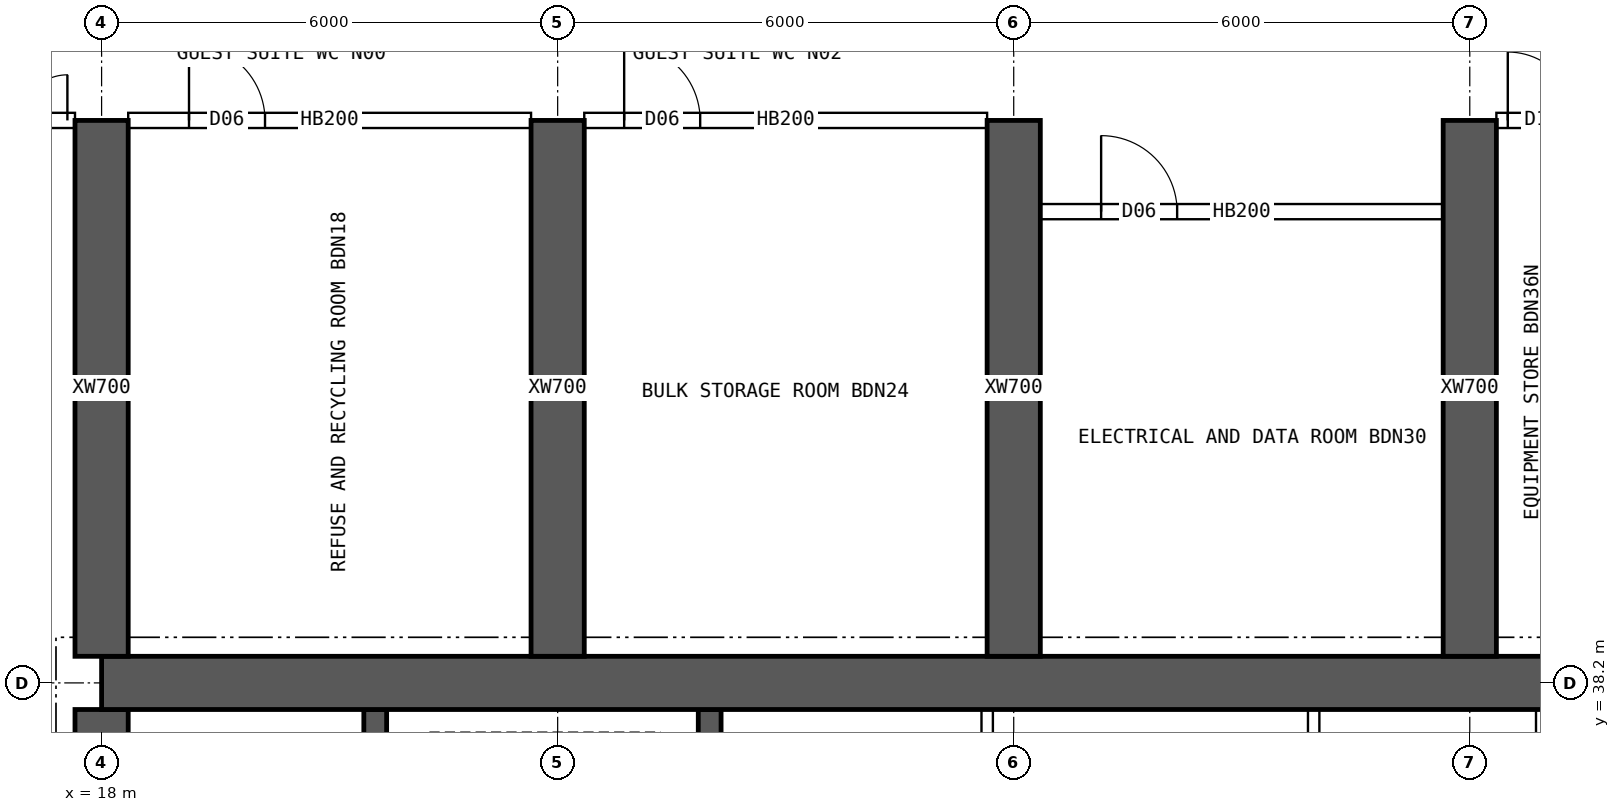
"""IFC4 building model, lengths in metres.
Left out: names, types, materials, properties, quantities, classifications, styles, units other than length and angle.
Written with IfcOpenShell. Run it as: python <this file> out.ifc"""

import sys

from ifc_helpers import new_model, si_unit, direction, frame, frame_2d, origin, place, context, subcontext, project, spatial, rectangle, extrude, element, fill, save


model = new_model("IFC4")
c1 = context("Model", 3, precision=1e-05, world=origin(), true_north=direction((0.0, 1.0)))
c2 = subcontext(c1, "Body", "Model", "MODEL_VIEW")
j1 = project(units=[si_unit("LENGTHUNIT", "METRE"), si_unit("PLANEANGLEUNIT", "RADIAN")], contexts=[c1])
p1 = place(None, origin())
s1 = spatial("IfcSite", under=j1, at=p1, CompositionType="ELEMENT")
p2 = place(p1, origin())
s2 = spatial("IfcBuilding", under=s1, at=p2, CompositionType="ELEMENT")
p3 = place(p2, frame((0.0, 0.0, 239.05)))
s3 = spatial("IfcBuildingStorey", under=s2, at=p3, CompositionType="ELEMENT", Elevation=239.05)
p4 = place(p3, frame((18.0, 38.2, 0.0), z_axis=(0.0, 0.0, 1.0), x_axis=(1.0, 0.0, 0.0)))
e1 = element("IfcWall", 1, at=p4, inside=s3, PredefinedType="SHEAR", context=c2, shape_type="SweptSolid", body=[
    extrude(rectangle(XDim=48.0, YDim=0.7, at=frame_2d((24.0, 0.0))), origin(), (0.0, 0.0, 1.0), 3.75),
])
p5 = place(p3, frame((18.0, 26.15, 0.0), z_axis=(0.0, 0.0, 1.0), x_axis=(0.0, 1.0, 0.0)))
e2 = element("IfcWall", 2, at=p5, inside=s3, PredefinedType="SHEAR", context=c2, shape_type="SweptSolid", body=[
    extrude(rectangle(XDim=11.7, YDim=0.7, at=frame_2d((5.85, 0.0))), origin(), (0.0, 0.0, 1.0), 3.75),
])
p6 = place(p5, frame((5.15, 0.0, 0.0)))
e3 = element("IfcOpeningElement", 3, at=p6, cuts=e2, PredefinedType="OPENING", context=c2, shape_type="SweptSolid", body=[
    extrude(rectangle(XDim=1.2, YDim=2.1, at=frame_2d((0.6, 1.05))), frame((0.0, 0.36, 0.0), z_axis=(0.0, -1.0, 0.0), x_axis=(1.0, 0.0, 0.0)), (0.0, 0.0, 1.0), 0.72),
])
for number, where, z_axis, x_axis in (
    (4, (21.6, 34.75, 0.0), (0.0, 0.0, 1.0), (0.0, 1.0, 0.0)),
    (5, (26.0, 34.75, 0.0), (0.0, 0.0, 1.0), (0.0, 1.0, 0.0)),
):
    element("IfcWall", number, at=place(p3, frame(where, z_axis=z_axis, x_axis=x_axis)), inside=s3, PredefinedType="SHEAR", context=c2, shape_type="SweptSolid", body=[
        extrude(rectangle(XDim=3.1, YDim=0.3, at=frame_2d((1.55, 0.0))), origin(), (0.0, 0.0, 1.0), 3.75),
    ])
for number, where, z_axis, x_axis in (
    (6, (18.0, 38.55, 0.0), (0.0, 0.0, 1.0), (0.0, 1.0, 0.0)),
    (7, (24.0, 38.55, 0.0), (0.0, 0.0, 1.0), (0.0, 1.0, 0.0)),
    (8, (30.0, 38.55, 0.0), (0.0, 0.0, 1.0), (0.0, 1.0, 0.0)),
    (9, (36.0, 38.55, 0.0), (0.0, 0.0, 1.0), (0.0, 1.0, 0.0)),
):
    element("IfcWall", number, at=place(p3, frame(where, z_axis=z_axis, x_axis=x_axis)), inside=s3, PredefinedType="SHEAR", context=c2, shape_type="SweptSolid", body=[
        extrude(rectangle(XDim=7.05, YDim=0.7, at=frame_2d((3.525, 0.0))), origin(), (0.0, 0.0, 1.0), 3.75),
    ])
for number, where, z_axis, x_axis in (
    (10, (29.651, 34.75, 0.0), (0.0, 0.0, 1.0), (0.0, 1.0, 0.0)),
    (11, (33.946, 34.75, 0.0), (0.0, 0.0, 1.0), (0.0, 1.0, 0.0)),
    (12, (36.946, 34.75, 0.0), (0.0, 0.0, 1.0), (0.0, 1.0, 0.0)),
):
    element("IfcWall", number, at=place(p3, frame(where, z_axis=z_axis, x_axis=x_axis)), inside=s3, PredefinedType="SOLIDWALL", context=c2, shape_type="SweptSolid", body=[
        extrude(rectangle(XDim=3.1, YDim=0.15, at=frame_2d((1.55, 0.0))), origin(), (0.0, 0.0, 1.0), 3.5),
    ])
p7 = place(p3, frame((15.6, 45.6, 0.0), z_axis=(0.0, 0.0, 1.0), x_axis=(1.0, 0.0, 0.0)))
e13 = element("IfcWall", 13, at=p7, inside=s3, PredefinedType="SOLIDWALL", context=c2, shape_type="SweptSolid", body=[
    extrude(rectangle(XDim=2.05, YDim=0.2, at=frame_2d((1.025, 0.0))), origin(), (0.0, 0.0, 1.0), 3.5),
])
p8 = place(p7, frame((0.75, 0.0, 0.0)))
e14 = element("IfcOpeningElement", 14, at=p8, cuts=e13, PredefinedType="OPENING", context=c2, shape_type="SweptSolid", body=[
    extrude(rectangle(XDim=1.2, YDim=2.1, at=frame_2d((0.6, 1.05))), frame((0.0, 0.11, 0.0), z_axis=(0.0, -1.0, 0.0), x_axis=(1.0, 0.0, 0.0)), (0.0, 0.0, 1.0), 0.22),
])
p9 = place(p3, frame((18.35, 45.6, 0.0), z_axis=(0.0, 0.0, 1.0), x_axis=(1.0, 0.0, 0.0)))
e15 = element("IfcWall", 15, at=p9, inside=s3, PredefinedType="SOLIDWALL", context=c2, shape_type="SweptSolid", body=[
    extrude(rectangle(XDim=5.3, YDim=0.2, at=frame_2d((2.65, 0.0))), origin(), (0.0, 0.0, 1.0), 3.5),
])
p10 = place(p9, frame((0.8, 0.0, 0.0)))
e16 = element("IfcOpeningElement", 16, at=p10, cuts=e15, PredefinedType="OPENING", context=c2, shape_type="SweptSolid", body=[
    extrude(rectangle(XDim=1.0, YDim=2.1, at=frame_2d((0.5, 1.05))), frame((0.0, 0.11, 0.0), z_axis=(0.0, -1.0, 0.0), x_axis=(1.0, 0.0, 0.0)), (0.0, 0.0, 1.0), 0.22),
])
p11 = place(p3, frame((24.35, 45.6, 0.0), z_axis=(0.0, 0.0, 1.0), x_axis=(1.0, 0.0, 0.0)))
e17 = element("IfcWall", 17, at=p11, inside=s3, PredefinedType="SOLIDWALL", context=c2, shape_type="SweptSolid", body=[
    extrude(rectangle(XDim=5.3, YDim=0.2, at=frame_2d((2.65, 0.0))), origin(), (0.0, 0.0, 1.0), 3.5),
])
p12 = place(p11, frame((0.525, 0.0, 0.0)))
e18 = element("IfcOpeningElement", 18, at=p12, cuts=e17, PredefinedType="OPENING", context=c2, shape_type="SweptSolid", body=[
    extrude(rectangle(XDim=1.0, YDim=2.1, at=frame_2d((0.5, 1.05))), frame((0.0, 0.11, 0.0), z_axis=(0.0, -1.0, 0.0), x_axis=(1.0, 0.0, 0.0)), (0.0, 0.0, 1.0), 0.22),
])
p13 = place(p3, frame((36.35, 45.6, 0.0), z_axis=(0.0, 0.0, 1.0), x_axis=(1.0, 0.0, 0.0)))
e19 = element("IfcWall", 19, at=p13, inside=s3, PredefinedType="SOLIDWALL", context=c2, shape_type="SweptSolid", body=[
    extrude(rectangle(XDim=5.3, YDim=0.2, at=frame_2d((2.65, 0.0))), origin(), (0.0, 0.0, 1.0), 3.5),
])
p14 = place(p13, frame((0.15, 0.0, 0.0)))
e20 = element("IfcOpeningElement", 20, at=p14, cuts=e19, PredefinedType="OPENING", context=c2, shape_type="SweptSolid", body=[
    extrude(rectangle(XDim=0.9, YDim=2.1, at=frame_2d((0.45, 1.05))), frame((0.0, 0.11, 0.0), z_axis=(0.0, -1.0, 0.0), x_axis=(1.0, 0.0, 0.0)), (0.0, 0.0, 1.0), 0.22),
])
p15 = place(p13, frame((2.34, 0.0, 0.0)))
e21 = element("IfcOpeningElement", 21, at=p15, cuts=e19, PredefinedType="OPENING", context=c2, shape_type="SweptSolid", body=[
    extrude(rectangle(XDim=0.9, YDim=2.1, at=frame_2d((0.45, 1.05))), frame((0.0, 0.11, 0.0), z_axis=(0.0, -1.0, 0.0), x_axis=(1.0, 0.0, 0.0)), (0.0, 0.0, 1.0), 0.22),
])
p16 = place(p3, frame((30.35, 44.4, 0.0), z_axis=(0.0, 0.0, 1.0), x_axis=(1.0, 0.0, 0.0)))
e22 = element("IfcWall", 22, at=p16, inside=s3, PredefinedType="SOLIDWALL", context=c2, shape_type="SweptSolid", body=[
    extrude(rectangle(XDim=5.3, YDim=0.2, at=frame_2d((2.65, 0.0))), origin(), (0.0, 0.0, 1.0), 3.5),
])
p17 = place(p16, frame((0.8, 0.0, 0.0)))
e23 = element("IfcOpeningElement", 23, at=p17, cuts=e22, PredefinedType="OPENING", context=c2, shape_type="SweptSolid", body=[
    extrude(rectangle(XDim=1.0, YDim=2.1, at=frame_2d((0.5, 1.05))), frame((0.0, 0.11, 0.0), z_axis=(0.0, -1.0, 0.0), x_axis=(1.0, 0.0, 0.0)), (0.0, 0.0, 1.0), 0.22),
])
p18 = place(p8, origin())
e24 = element("IfcDoor", 24, at=p18, inside=s3, OperationType="DOUBLE_DOOR_SINGLE_SWING", PredefinedType="DOOR", context=c2, shape_type="SweptSolid", body=[
    extrude(rectangle(XDim=1.2, YDim=2.1, at=frame_2d((0.6, 1.05))), frame((0.0, 0.025, 0.0), z_axis=(0.0, -1.0, 0.0), x_axis=(1.0, 0.0, 0.0)), (0.0, 0.0, 1.0), 0.05),
])
fill(e14, e24)
p19 = place(p10, origin())
e25 = element("IfcDoor", 25, at=p19, inside=s3, OperationType="SINGLE_SWING_LEFT", PredefinedType="DOOR", context=c2, shape_type="SweptSolid", body=[
    extrude(rectangle(XDim=1.0, YDim=2.1, at=frame_2d((0.5, 1.05))), frame((0.0, 0.025, 0.0), z_axis=(0.0, -1.0, 0.0), x_axis=(1.0, 0.0, 0.0)), (0.0, 0.0, 1.0), 0.05),
])
fill(e16, e25)
p20 = place(p12, origin())
e26 = element("IfcDoor", 26, at=p20, inside=s3, OperationType="SINGLE_SWING_LEFT", PredefinedType="DOOR", context=c2, shape_type="SweptSolid", body=[
    extrude(rectangle(XDim=1.0, YDim=2.1, at=frame_2d((0.5, 1.05))), frame((0.0, 0.025, 0.0), z_axis=(0.0, -1.0, 0.0), x_axis=(1.0, 0.0, 0.0)), (0.0, 0.0, 1.0), 0.05),
])
fill(e18, e26)
p21 = place(p17, origin())
e27 = element("IfcDoor", 27, at=p21, inside=s3, OperationType="SINGLE_SWING_LEFT", PredefinedType="DOOR", context=c2, shape_type="SweptSolid", body=[
    extrude(rectangle(XDim=1.0, YDim=2.1, at=frame_2d((0.5, 1.05))), frame((0.0, 0.025, 0.0), z_axis=(0.0, -1.0, 0.0), x_axis=(1.0, 0.0, 0.0)), (0.0, 0.0, 1.0), 0.05),
])
fill(e23, e27)
p22 = place(p14, origin())
e28 = element("IfcDoor", 28, at=p22, inside=s3, OperationType="SINGLE_SWING_LEFT", PredefinedType="DOOR", context=c2, shape_type="SweptSolid", body=[
    extrude(rectangle(XDim=0.9, YDim=2.1, at=frame_2d((0.45, 1.05))), frame((0.0, 0.025, 0.0), z_axis=(0.0, -1.0, 0.0), x_axis=(1.0, 0.0, 0.0)), (0.0, 0.0, 1.0), 0.05),
])
fill(e20, e28)
save(model, sys.argv[1])
